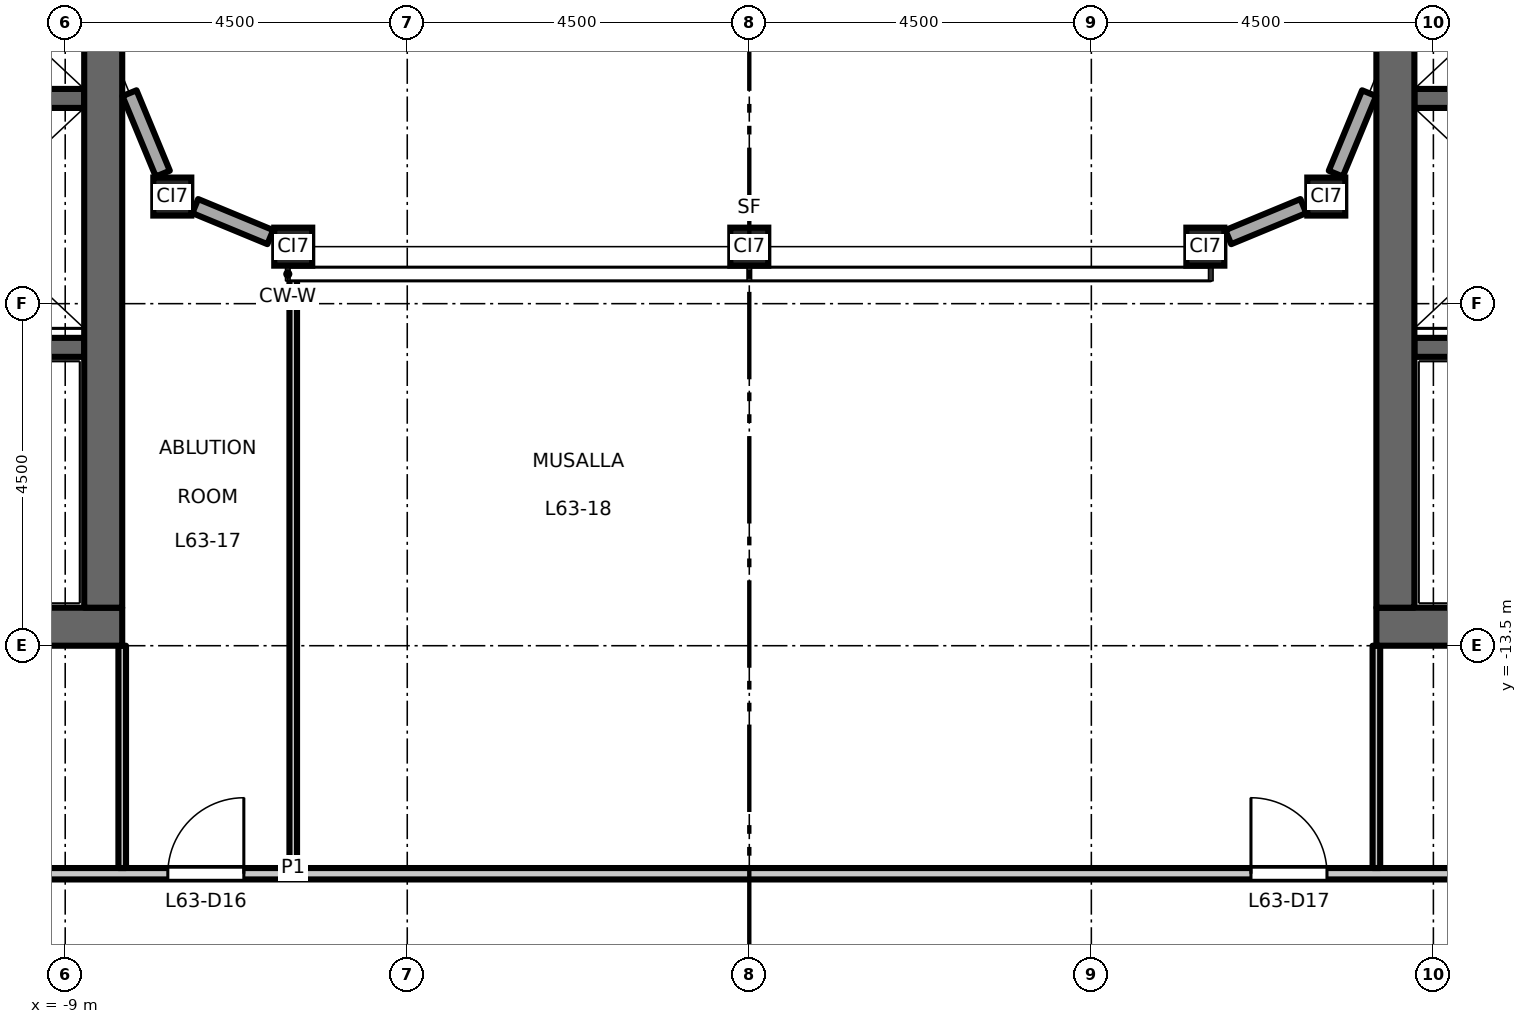
"""IFC4 building model, lengths in metres.
Left out: names, types, materials, properties, quantities, classifications, styles, units other than length and angle.
Written with IfcOpenShell. Run it as: python <this file> out.ifc"""

import sys

from ifc_helpers import new_model, si_unit, direction, frame, frame_2d, origin, origin_2d, place, context, subcontext, project, spatial, rectangle, hollow_rectangle, extrude, element, fill, save


model = new_model("IFC4")
c1 = context("Model", 3, precision=1e-05, world=origin(), true_north=direction((0.0, 1.0)))
c2 = subcontext(c1, "Body", "Model", "MODEL_VIEW")
j1 = project(units=[si_unit("LENGTHUNIT", "METRE"), si_unit("PLANEANGLEUNIT", "RADIAN")], contexts=[c1])
p1 = place(None, origin())
s1 = spatial("IfcSite", under=j1, at=p1, CompositionType="ELEMENT")
p2 = place(p1, origin())
s2 = spatial("IfcBuilding", under=s1, at=p2, CompositionType="ELEMENT")
p3 = place(p2, frame((0.0, 0.0, 294.2)))
s3 = spatial("IfcBuildingStorey", under=s2, at=p3, CompositionType="ELEMENT", Elevation=294.2)
for number, where, z_axis, x_axis in (
    (1, (-7.591, -7.591, 0.0), (0.0, 0.0, 1.0), (1.0, 0.0, 0.0)),
    (2, (-6.0, -8.25, 0.0), (0.0, 0.0, 1.0), (1.0, 0.0, 0.0)),
    (3, (0.0, -8.25, 0.0), (0.0, 0.0, 1.0), (1.0, 0.0, 0.0)),
    (4, (6.0, -8.25, 0.0), (0.0, 0.0, 1.0), (1.0, 0.0, 0.0)),
    (5, (7.591, -7.591, 0.0), (0.0, 0.0, 1.0), (1.0, 0.0, 0.0)),
):
    element("IfcColumn", number, at=place(p3, frame(where, z_axis=z_axis, x_axis=x_axis)), inside=s3, PredefinedType="COLUMN", context=c2, shape_type="SweptSolid", body=[
        extrude(hollow_rectangle(XDim=0.5, YDim=0.5, WallThickness=0.025, at=origin_2d()), origin(), (0.0, 0.0, 1.0), 4.5),
    ])
p4 = place(p3, frame((-8.75, -6.3, 0.0), z_axis=(0.0, 0.0, 1.0), x_axis=(-1.0, 0.0, 0.0)))
e6 = element("IfcWall", 6, at=p4, inside=s3, PredefinedType="SHEAR", context=c2, shape_type="SweptSolid", body=[
    extrude(rectangle(XDim=3.1, YDim=0.25, at=frame_2d((1.55, 0.0))), origin(), (0.0, 0.0, 1.0), 4.35),
])
p5 = place(p3, frame((-8.75, -9.575, 0.0), z_axis=(0.0, 0.0, 1.0), x_axis=(-1.0, 0.0, 0.0)))
e7 = element("IfcWall", 7, at=p5, inside=s3, PredefinedType="SHEAR", context=c2, shape_type="SweptSolid", body=[
    extrude(rectangle(XDim=8.0, YDim=0.25, at=frame_2d((4.0, 0.0))), origin(), (0.0, 0.0, 1.0), 4.35),
])
p6 = place(p5, frame((6.65, 0.0, 0.0)))
e8 = element("IfcOpeningElement", 8, at=p6, cuts=e7, PredefinedType="OPENING", context=c2, shape_type="SweptSolid", body=[
    extrude(rectangle(XDim=1.1, YDim=2.1, at=frame_2d((0.55, 1.05))), frame((0.0, 0.135, 0.0), z_axis=(0.0, -1.0, 0.0), x_axis=(1.0, 0.0, 0.0)), (0.0, 0.0, 1.0), 0.27),
])
p7 = place(p3, frame((-8.25, -13.25, 0.0), z_axis=(0.0, 0.0, 1.0), x_axis=(-1.0, 0.0, 0.0)))
e9 = element("IfcWall", 9, at=p7, inside=s3, PredefinedType="SHEAR", context=c2, shape_type="SweptSolid", body=[
    extrude(rectangle(XDim=9.0, YDim=0.5, at=frame_2d((4.5, 0.0))), origin(), (0.0, 0.0, 1.0), 4.35),
])
p8 = place(p3, frame((-8.5, -13.0, 0.0), z_axis=(0.0, 0.0, 1.0), x_axis=(0.0, 1.0, 0.0)))
e10 = element("IfcWall", 10, at=p8, inside=s3, PredefinedType="SHEAR", context=c2, shape_type="SweptSolid", body=[
    extrude(rectangle(XDim=26.0, YDim=0.5, at=frame_2d((13.0, 0.0))), origin(), (0.0, 0.0, 1.0), 4.35),
])
p9 = place(p3, frame((8.75, -6.3, 0.0), z_axis=(0.0, 0.0, 1.0), x_axis=(1.0, 0.0, 0.0)))
e11 = element("IfcWall", 11, at=p9, inside=s3, PredefinedType="SHEAR", context=c2, shape_type="SweptSolid", body=[
    extrude(rectangle(XDim=3.1, YDim=0.25, at=frame_2d((1.55, 0.0))), origin(), (0.0, 0.0, 1.0), 4.35),
])
p10 = place(p3, frame((8.75, -9.575, 0.0), z_axis=(0.0, 0.0, 1.0), x_axis=(1.0, 0.0, 0.0)))
e12 = element("IfcWall", 12, at=p10, inside=s3, PredefinedType="SHEAR", context=c2, shape_type="SweptSolid", body=[
    extrude(rectangle(XDim=8.0, YDim=0.25, at=frame_2d((4.0, 0.0))), origin(), (0.0, 0.0, 1.0), 4.35),
])
p11 = place(p10, frame((6.65, 0.0, 0.0)))
e13 = element("IfcOpeningElement", 13, at=p11, cuts=e12, PredefinedType="OPENING", context=c2, shape_type="SweptSolid", body=[
    extrude(rectangle(XDim=1.1, YDim=2.1, at=frame_2d((0.55, 1.05))), frame((0.0, 0.135, 0.0), z_axis=(0.0, -1.0, 0.0), x_axis=(1.0, 0.0, 0.0)), (0.0, 0.0, 1.0), 0.27),
])
p12 = place(p3, frame((8.25, -13.25, 0.0), z_axis=(0.0, 0.0, 1.0), x_axis=(1.0, 0.0, 0.0)))
e14 = element("IfcWall", 14, at=p12, inside=s3, PredefinedType="SHEAR", context=c2, shape_type="SweptSolid", body=[
    extrude(rectangle(XDim=9.0, YDim=0.5, at=frame_2d((4.5, 0.0))), origin(), (0.0, 0.0, 1.0), 4.35),
])
p13 = place(p3, frame((8.5, -13.0, 0.0), z_axis=(0.0, 0.0, 1.0), x_axis=(0.0, 1.0, 0.0)))
e15 = element("IfcWall", 15, at=p13, inside=s3, PredefinedType="SHEAR", context=c2, shape_type="SweptSolid", body=[
    extrude(rectangle(XDim=26.0, YDim=0.5, at=frame_2d((13.0, 0.0))), origin(), (0.0, 0.0, 1.0), 4.35),
])
p14 = place(p3, frame((6.302, -8.125, 0.0), z_axis=(0.0, 0.0, 1.0), x_axis=(0.923919409248, 0.382587147216, 0.0)))
e16 = element("IfcWall", 16, at=p14, inside=s3, PredefinedType="STANDARD", context=c2, shape_type="SweptSolid", body=[
    extrude(rectangle(XDim=1.069, YDim=0.2, at=frame_2d((0.534, 0.0))), origin(), (0.0, 0.0, 1.0), 4.01),
])
for number, where, z_axis, x_axis in (
    (17, (7.716, -7.289, 0.0), (0.0, 0.0, 1.0), (0.383, 0.924, 0.0)),
    (18, (-8.154, -6.231, 0.0), (0.0, 0.0, 1.0), (0.383, -0.924, 0.0)),
):
    element("IfcWall", number, at=place(p3, frame(where, z_axis=z_axis, x_axis=x_axis)), inside=s3, PredefinedType="STANDARD", context=c2, shape_type="SweptSolid", body=[
        extrude(rectangle(XDim=1.146, YDim=0.2, at=frame_2d((0.573, 0.0))), origin(), (0.0, 0.0, 1.0), 4.01),
    ])
p15 = place(p3, frame((-7.289, -7.716, 0.0), z_axis=(0.0, 0.0, 1.0), x_axis=(0.923919409248, -0.382587147216, 0.0)))
e19 = element("IfcWall", 19, at=p15, inside=s3, PredefinedType="STANDARD", context=c2, shape_type="SweptSolid", body=[
    extrude(rectangle(XDim=1.069, YDim=0.2, at=frame_2d((0.534, 0.0))), origin(), (0.0, 0.0, 1.0), 4.01),
])
p16 = place(p3, frame((-17.325, -16.5, 0.0), z_axis=(0.0, 0.0, 1.0), x_axis=(1.0, 0.0, 0.0)))
e20 = element("IfcWall", 20, at=p16, inside=s3, PredefinedType="PARTITIONING", context=c2, shape_type="SweptSolid", body=[
    extrude(rectangle(XDim=34.65, YDim=0.15, at=frame_2d((17.325, 0.0))), origin(), (0.0, 0.0, 1.0), 4.35),
])
p17 = place(p16, frame((9.675, 0.0, 0.0)))
e21 = element("IfcOpeningElement", 21, at=p17, cuts=e20, PredefinedType="OPENING", context=c2, shape_type="SweptSolid", body=[
    extrude(rectangle(XDim=1.0, YDim=2.1, at=frame_2d((0.5, 1.05))), frame((0.0, 0.085, 0.0), z_axis=(0.0, -1.0, 0.0), x_axis=(1.0, 0.0, 0.0)), (0.0, 0.0, 1.0), 0.17),
])
p18 = place(p16, frame((23.925, 0.0, 0.0)))
e22 = element("IfcOpeningElement", 22, at=p18, cuts=e20, PredefinedType="OPENING", context=c2, shape_type="SweptSolid", body=[
    extrude(rectangle(XDim=1.0, YDim=2.1, at=frame_2d((0.5, 1.05))), frame((0.0, 0.085, 0.0), z_axis=(0.0, -1.0, 0.0), x_axis=(1.0, 0.0, 0.0)), (0.0, 0.0, 1.0), 0.17),
])
p19 = place(p16, frame((0.675, 0.0, 0.0)))
e23 = element("IfcOpeningElement", 23, at=p19, cuts=e20, PredefinedType="OPENING", context=c2, shape_type="SweptSolid", body=[
    extrude(rectangle(XDim=1.0, YDim=2.1, at=frame_2d((0.5, 1.05))), frame((0.0, 0.085, 0.0), z_axis=(0.0, -1.0, 0.0), x_axis=(1.0, 0.0, 0.0)), (0.0, 0.0, 1.0), 0.17),
])
p20 = place(p16, frame((32.925, 0.0, 0.0)))
e24 = element("IfcOpeningElement", 24, at=p20, cuts=e20, PredefinedType="OPENING", context=c2, shape_type="SweptSolid", body=[
    extrude(rectangle(XDim=1.0, YDim=2.1, at=frame_2d((0.5, 1.05))), frame((0.0, 0.085, 0.0), z_axis=(0.0, -1.0, 0.0), x_axis=(1.0, 0.0, 0.0)), (0.0, 0.0, 1.0), 0.17),
])
p21 = place(p3, frame((-8.25, -16.425, 0.0), z_axis=(0.0, 0.0, 1.0), x_axis=(0.0, 1.0, 0.0)))
e25 = element("IfcWall", 25, at=p21, inside=s3, PredefinedType="PARTITIONING", context=c2, shape_type="SweptSolid", body=[
    extrude(rectangle(XDim=2.925, YDim=0.1, at=frame_2d((1.462, 0.0))), origin(), (0.0, 0.0, 1.0), 4.35),
])
p22 = place(p3, frame((-6.0, -16.425, 0.0), z_axis=(0.0, 0.0, 1.0), x_axis=(0.0, 1.0, 0.0)))
e26 = element("IfcWall", 26, at=p22, inside=s3, PredefinedType="PARTITIONING", context=c2, shape_type="SweptSolid", body=[
    extrude(rectangle(XDim=7.875, YDim=0.1, at=frame_2d((3.938, 0.0))), origin(), (0.0, 0.0, 1.0), 4.35),
])
p23 = place(p3, frame((8.25, -16.425, 0.0), z_axis=(0.0, 0.0, 1.0), x_axis=(0.0, 1.0, 0.0)))
e27 = element("IfcWall", 27, at=p23, inside=s3, PredefinedType="PARTITIONING", context=c2, shape_type="SweptSolid", body=[
    extrude(rectangle(XDim=2.925, YDim=0.1, at=frame_2d((1.462, 0.0))), origin(), (0.0, 0.0, 1.0), 4.35),
])
p24 = place(p17, origin())
e28 = element("IfcDoor", 28, at=p24, inside=s3, OperationType="SINGLE_SWING_RIGHT", PredefinedType="DOOR", context=c2, shape_type="SweptSolid", body=[
    extrude(rectangle(XDim=1.0, YDim=2.1, at=frame_2d((0.5, 1.05))), frame((0.0, 0.025, 0.0), z_axis=(0.0, -1.0, 0.0), x_axis=(1.0, 0.0, 0.0)), (0.0, 0.0, 1.0), 0.05),
])
fill(e21, e28)
p25 = place(p18, origin())
e29 = element("IfcDoor", 29, at=p25, inside=s3, OperationType="SINGLE_SWING_LEFT", PredefinedType="DOOR", context=c2, shape_type="SweptSolid", body=[
    extrude(rectangle(XDim=1.0, YDim=2.1, at=frame_2d((0.5, 1.05))), frame((0.0, 0.025, 0.0), z_axis=(0.0, -1.0, 0.0), x_axis=(1.0, 0.0, 0.0)), (0.0, 0.0, 1.0), 0.05),
])
fill(e22, e29)
save(model, sys.argv[1])
